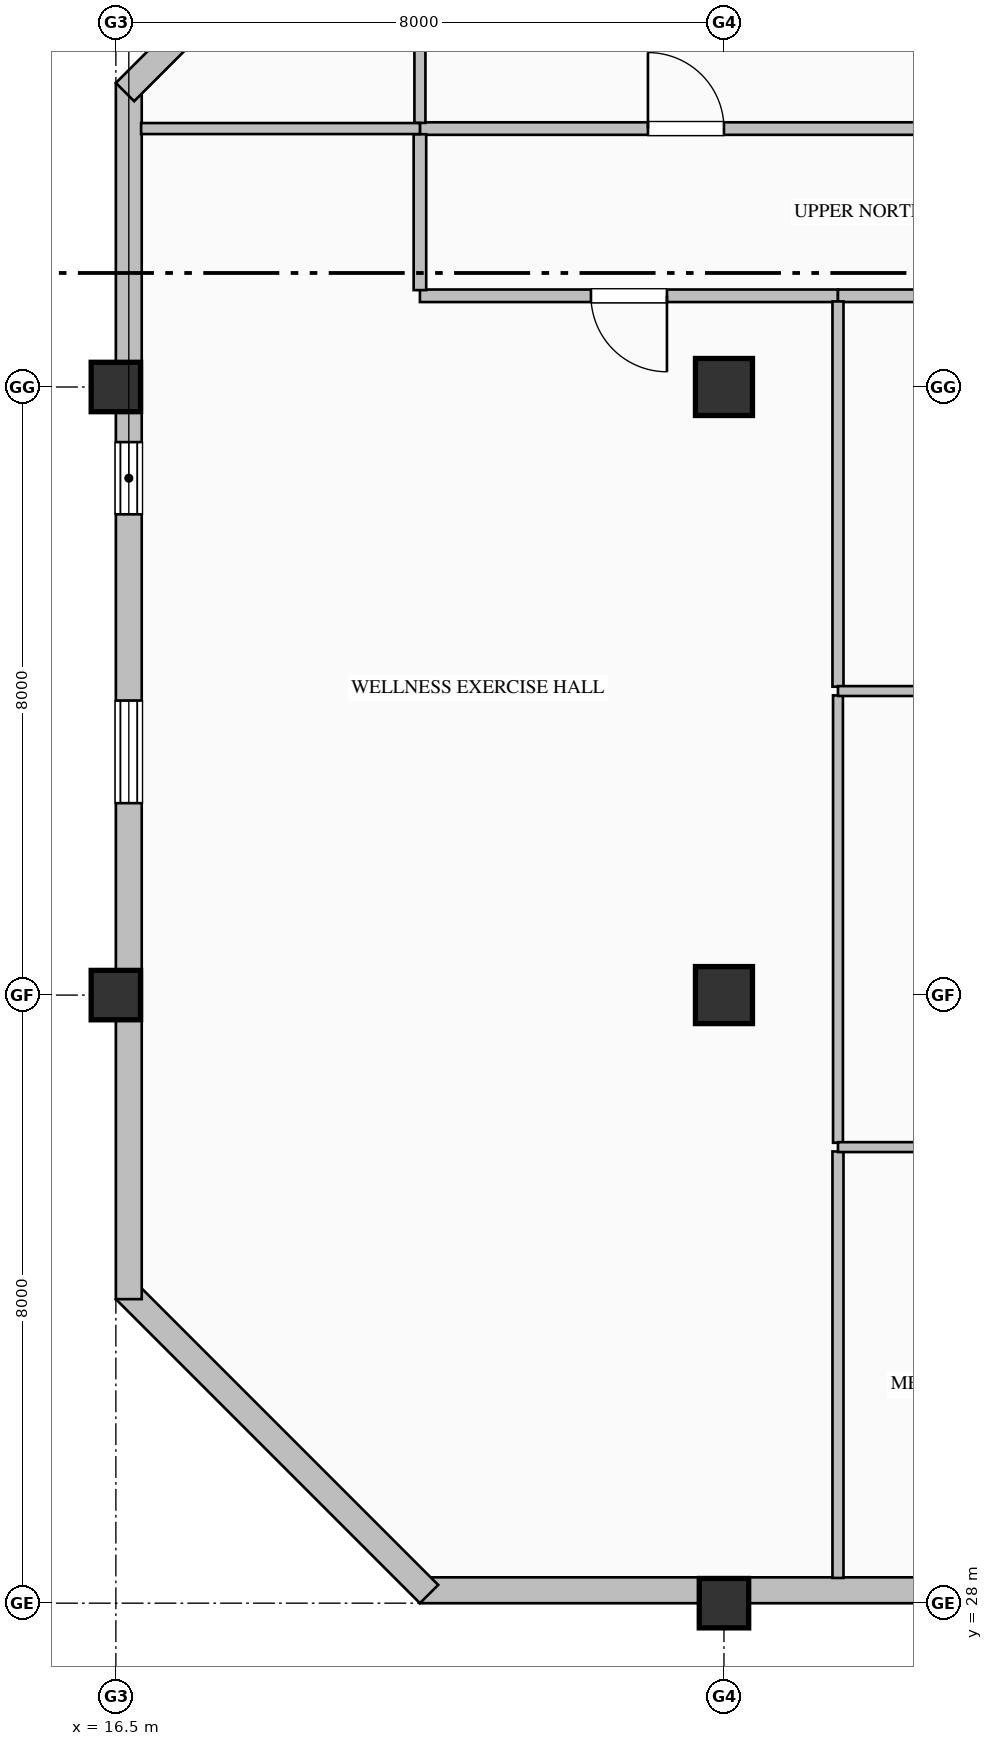
"""IFC4 building model, lengths in metres.
Left out: names, types, materials, properties, quantities, classifications, styles, units other than length and angle.
Written with IfcOpenShell. Run it as: python <this file> out.ifc"""

import sys

from ifc_helpers import new_model, si_unit, direction, frame, frame_2d, origin, origin_2d, place, context, subcontext, project, spatial, rectangle, hollow_rectangle, extrude, element, fill, save


model = new_model("IFC4")
c1 = context("Model", 3, precision=1e-05, world=origin(), true_north=direction((0.0, 1.0)))
c2 = subcontext(c1, "Body", "Model", "MODEL_VIEW")
j1 = project(units=[si_unit("LENGTHUNIT", "METRE"), si_unit("PLANEANGLEUNIT", "RADIAN")], contexts=[c1])
p1 = place(None, origin())
s1 = spatial("IfcSite", under=j1, at=p1, CompositionType="ELEMENT")
p2 = place(p1, origin())
s2 = spatial("IfcBuilding", under=s1, at=p2, CompositionType="ELEMENT")
p3 = place(p2, frame((0.0, 0.0, 339.2)))
s3 = spatial("IfcBuildingStorey", under=s2, at=p3, CompositionType="ELEMENT", Elevation=339.2)
for number, where, z_axis, x_axis in (
    (1, (16.5, 36.0, 0.0), (0.0, 0.0, 1.0), (1.0, 0.0, 0.0)),
    (2, (16.5, 44.0, 0.0), (0.0, 0.0, 1.0), (1.0, 0.0, 0.0)),
    (3, (24.5, 28.0, 0.0), (0.0, 0.0, 1.0), (1.0, 0.0, 0.0)),
):
    element("IfcColumn", number, at=place(p3, frame(where, z_axis=z_axis, x_axis=x_axis)), inside=s3, PredefinedType="COLUMN", context=c2, shape_type="SweptSolid", body=[
        extrude(hollow_rectangle(XDim=0.65, YDim=0.65, WallThickness=0.028, at=origin_2d()), origin(), (0.0, 0.0, 1.0), 4.0),
    ])
for number, where, z_axis, x_axis in (
    (4, (24.5, 36.0, 0.0), (0.0, 0.0, 1.0), (1.0, 0.0, 0.0)),
    (5, (24.5, 44.0, 0.0), (0.0, 0.0, 1.0), (1.0, 0.0, 0.0)),
):
    element("IfcColumn", number, at=place(p3, frame(where, z_axis=z_axis, x_axis=x_axis)), inside=s3, PredefinedType="COLUMN", context=c2, shape_type="SweptSolid", body=[
        extrude(rectangle(XDim=0.75, YDim=0.75, at=origin_2d()), origin(), (0.0, 0.0, 1.0), 4.0),
    ])
p4 = place(p3, frame((40.52, 28.17, 0.0), z_axis=(0.0, 0.0, 1.0), x_axis=(-1.0, 0.0, 0.0)))
e6 = element("IfcWall", 6, at=p4, inside=s3, PredefinedType="SOLIDWALL", context=c2, shape_type="SweptSolid", body=[
    extrude(rectangle(XDim=20.02, YDim=0.34, at=frame_2d((10.01, 0.0))), origin(), (0.0, 0.0, 1.0), 3.185),
])
p5 = place(p4, frame((2.925, 0.0, 0.9)))
e7 = element("IfcOpeningElement", 7, at=p5, cuts=e6, PredefinedType="OPENING", context=c2, shape_type="SweptSolid", body=[
    extrude(rectangle(XDim=1.35, YDim=1.85, at=frame_2d((0.675, 0.925))), frame((0.0, 0.18, 0.0), z_axis=(0.0, -1.0, 0.0), x_axis=(1.0, 0.0, 0.0)), (0.0, 0.0, 1.0), 0.36),
])
p6 = place(p4, frame((10.275, 0.0, 0.8)))
e8 = element("IfcOpeningElement", 8, at=p6, cuts=e6, PredefinedType="OPENING", context=c2, shape_type="SweptSolid", body=[
    extrude(rectangle(XDim=1.05, YDim=2.15, at=frame_2d((0.525, 1.075))), frame((0.0, 0.18, 0.0), z_axis=(0.0, -1.0, 0.0), x_axis=(1.0, 0.0, 0.0)), (0.0, 0.0, 1.0), 0.36),
])
p7 = place(p3, frame((20.62, 28.12, 0.0), z_axis=(0.0, 0.0, 1.0), x_axis=(-0.707106781187, 0.707106781187, 0.0)))
e9 = element("IfcWall", 9, at=p7, inside=s3, PredefinedType="SOLIDWALL", context=c2, shape_type="SweptSolid", body=[
    extrude(rectangle(XDim=5.657, YDim=0.34, at=frame_2d((2.828, 0.0))), origin(), (0.0, 0.0, 1.0), 3.785),
])
p8 = place(p3, frame((16.67, 32.0, 0.0), z_axis=(0.0, 0.0, 1.0), x_axis=(0.0, 1.0, 0.0)))
e10 = element("IfcWall", 10, at=p8, inside=s3, PredefinedType="SOLIDWALL", context=c2, shape_type="SweptSolid", body=[
    extrude(rectangle(XDim=16.0, YDim=0.34, at=frame_2d((8.0, 0.0))), origin(), (0.0, 0.0, 1.0), 3.335),
])
p9 = place(p8, frame((6.525, 0.0, 0.9)))
e11 = element("IfcOpeningElement", 11, at=p9, cuts=e10, PredefinedType="OPENING", context=c2, shape_type="SweptSolid", body=[
    extrude(rectangle(XDim=1.35, YDim=1.85, at=frame_2d((0.675, 0.925))), frame((0.0, 0.18, 0.0), z_axis=(0.0, -1.0, 0.0), x_axis=(1.0, 0.0, 0.0)), (0.0, 0.0, 1.0), 0.36),
])
p10 = place(p8, frame((10.325, 0.0, 0.9)))
e12 = element("IfcOpeningElement", 12, at=p10, cuts=e10, PredefinedType="OPENING", context=c2, shape_type="SweptSolid", body=[
    extrude(rectangle(XDim=0.95, YDim=1.85, at=frame_2d((0.475, 0.925))), frame((0.0, 0.18, 0.0), z_axis=(0.0, -1.0, 0.0), x_axis=(1.0, 0.0, 0.0)), (0.0, 0.0, 1.0), 0.36),
])
p11 = place(p3, frame((16.62, 47.88, 0.0), z_axis=(0.0, 0.0, 1.0), x_axis=(0.707106781187, 0.707106781187, 0.0)))
e13 = element("IfcWall", 13, at=p11, inside=s3, PredefinedType="SOLIDWALL", context=c2, shape_type="SweptSolid", body=[
    extrude(rectangle(XDim=5.657, YDim=0.34, at=frame_2d((2.828, 0.0))), origin(), (0.0, 0.0, 1.0), 3.785),
])
p12 = place(p3, frame((20.5, 47.4, 0.0), z_axis=(0.0, 0.0, 1.0), x_axis=(1.0, 0.0, 0.0)))
e14 = element("IfcWall", 14, at=p12, inside=s3, PredefinedType="PARTITIONING", context=c2, shape_type="SweptSolid", body=[
    extrude(rectangle(XDim=7.0, YDim=0.165, at=frame_2d((3.5, 0.0))), origin(), (0.0, 0.0, 1.0), 3.785),
])
p13 = place(p12, frame((3.0, 0.0, 0.0)))
e15 = element("IfcOpeningElement", 15, at=p13, cuts=e14, PredefinedType="OPENING", context=c2, shape_type="SweptSolid", body=[
    extrude(rectangle(XDim=1.0, YDim=2.15, at=frame_2d((0.5, 1.075))), frame((0.0, 0.093, 0.0), z_axis=(0.0, -1.0, 0.0), x_axis=(1.0, 0.0, 0.0)), (0.0, 0.0, 1.0), 0.185),
])
p14 = place(p3, frame((26.0, 45.2, 0.0), z_axis=(0.0, 0.0, 1.0), x_axis=(-1.0, 0.0, 0.0)))
e16 = element("IfcWall", 16, at=p14, inside=s3, PredefinedType="PARTITIONING", context=c2, shape_type="SweptSolid", body=[
    extrude(rectangle(XDim=5.5, YDim=0.165, at=frame_2d((2.75, 0.0))), origin(), (0.0, 0.0, 1.0), 3.785),
])
p15 = place(p14, frame((2.25, 0.0, 0.0)))
e17 = element("IfcOpeningElement", 17, at=p15, cuts=e16, PredefinedType="OPENING", context=c2, shape_type="SweptSolid", body=[
    extrude(rectangle(XDim=1.0, YDim=2.15, at=frame_2d((0.5, 1.075))), frame((0.0, 0.093, 0.0), z_axis=(0.0, -1.0, 0.0), x_axis=(1.0, 0.0, 0.0)), (0.0, 0.0, 1.0), 0.185),
])
p16 = place(p3, frame((20.5, 45.274, 0.0), z_axis=(0.0, 0.0, 1.0), x_axis=(0.0, 1.0, 0.0)))
e18 = element("IfcWall", 18, at=p16, inside=s3, PredefinedType="PARTITIONING", context=c2, shape_type="SweptSolid", body=[
    extrude(rectangle(XDim=2.051, YDim=0.165, at=frame_2d((1.025, 0.0))), origin(), (0.0, 0.0, 1.0), 3.785),
])
p17 = place(p3, frame((35.4, 45.2, 0.0), z_axis=(0.0, 0.0, 1.0), x_axis=(-1.0, 0.0, 0.0)))
e19 = element("IfcWall", 19, at=p17, inside=s3, PredefinedType="PARTITIONING", context=c2, shape_type="SweptSolid", body=[
    extrude(rectangle(XDim=9.4, YDim=0.165, at=frame_2d((4.7, 0.0))), origin(), (0.0, 0.0, 1.0), 3.785),
])
p18 = place(p17, frame((4.2, 0.0, 0.0)))
e20 = element("IfcOpeningElement", 20, at=p18, cuts=e19, PredefinedType="OPENING", context=c2, shape_type="SweptSolid", body=[
    extrude(rectangle(XDim=1.0, YDim=2.15, at=frame_2d((0.5, 1.075))), frame((0.0, 0.093, 0.0), z_axis=(0.0, -1.0, 0.0), x_axis=(1.0, 0.0, 0.0)), (0.0, 0.0, 1.0), 0.185),
])
p19 = place(p3, frame((20.5, 51.531, 0.0), z_axis=(0.0, 0.0, 1.0), x_axis=(0.0, -1.0, 0.0)))
e21 = element("IfcWall", 21, at=p19, inside=s3, PredefinedType="PARTITIONING", context=c2, shape_type="SweptSolid", body=[
    extrude(rectangle(XDim=4.056, YDim=0.145, at=frame_2d((2.028, 0.0))), origin(), (0.0, 0.0, 1.0), 3.785),
])
p20 = place(p19, frame((1.528, 0.0, 0.0)))
e22 = element("IfcOpeningElement", 22, at=p20, cuts=e21, PredefinedType="OPENING", context=c2, shape_type="SweptSolid", body=[
    extrude(rectangle(XDim=1.0, YDim=2.15, at=frame_2d((0.5, 1.075))), frame((0.0, 0.083, 0.0), z_axis=(0.0, -1.0, 0.0), x_axis=(1.0, 0.0, 0.0)), (0.0, 0.0, 1.0), 0.165),
])
p21 = place(p3, frame((20.5, 47.4, 0.0), z_axis=(0.0, 0.0, 1.0), x_axis=(-1.0, 0.0, 0.0)))
e23 = element("IfcWall", 23, at=p21, inside=s3, PredefinedType="PARTITIONING", context=c2, shape_type="SweptSolid", body=[
    extrude(rectangle(XDim=3.668, YDim=0.145, at=frame_2d((1.834, 0.0))), origin(), (0.0, 0.0, 1.0), 3.785),
])
p22 = place(p3, frame((26.0, 33.943, 0.0), z_axis=(0.0, 0.0, 1.0), x_axis=(0.0, -1.0, 0.0)))
e24 = element("IfcWall", 24, at=p22, inside=s3, PredefinedType="PARTITIONING", context=c2, shape_type="SweptSolid", body=[
    extrude(rectangle(XDim=5.611, YDim=0.145, at=frame_2d((2.806, 0.0))), origin(), (0.0, 0.0, 1.0), 3.785),
])
p23 = place(p3, frame((26.0, 39.943, 0.0), z_axis=(0.0, 0.0, 1.0), x_axis=(0.0, -1.0, 0.0)))
e25 = element("IfcWall", 25, at=p23, inside=s3, PredefinedType="PARTITIONING", context=c2, shape_type="SweptSolid", body=[
    extrude(rectangle(XDim=5.886, YDim=0.13, at=frame_2d((2.943, 0.0))), origin(), (0.0, 0.0, 1.0), 3.785),
])
p24 = place(p3, frame((26.0, 45.125, 0.0), z_axis=(0.0, 0.0, 1.0), x_axis=(0.0, -1.0, 0.0)))
e26 = element("IfcWall", 26, at=p24, inside=s3, PredefinedType="PARTITIONING", context=c2, shape_type="SweptSolid", body=[
    extrude(rectangle(XDim=5.069, YDim=0.145, at=frame_2d((2.534, 0.0))), origin(), (0.0, 0.0, 1.0), 3.785),
])
p25 = place(p3, frame((26.0, 34.0, 0.0), z_axis=(0.0, 0.0, 1.0), x_axis=(1.0, 0.0, 0.0)))
e27 = element("IfcWall", 27, at=p25, inside=s3, PredefinedType="PARTITIONING", context=c2, shape_type="SweptSolid", body=[
    extrude(rectangle(XDim=9.4, YDim=0.13, at=frame_2d((4.7, 0.0))), origin(), (0.0, 0.0, 1.0), 3.785),
])
p26 = place(p25, frame((4.2, 0.0, 0.0)))
e28 = element("IfcOpeningElement", 28, at=p26, cuts=e27, PredefinedType="OPENING", context=c2, shape_type="SweptSolid", body=[
    extrude(rectangle(XDim=1.0, YDim=2.15, at=frame_2d((0.5, 1.075))), frame((0.0, 0.075, 0.0), z_axis=(0.0, -1.0, 0.0), x_axis=(1.0, 0.0, 0.0)), (0.0, 0.0, 1.0), 0.15),
])
p27 = place(p3, frame((26.0, 40.0, 0.0), z_axis=(0.0, 0.0, 1.0), x_axis=(1.0, 0.0, 0.0)))
e29 = element("IfcWall", 29, at=p27, inside=s3, PredefinedType="PARTITIONING", context=c2, shape_type="SweptSolid", body=[
    extrude(rectangle(XDim=9.4, YDim=0.13, at=frame_2d((4.7, 0.0))), origin(), (0.0, 0.0, 1.0), 3.785),
])
p28 = place(p9, origin())
e30 = element("IfcWindow", 30, at=p28, inside=s3, PartitioningType="DOUBLE_PANEL_VERTICAL", PredefinedType="WINDOW", context=c2, shape_type="SweptSolid", body=[
    extrude(rectangle(XDim=1.35, YDim=1.85, at=frame_2d((0.675, 0.925))), frame((0.0, 0.15, 0.0), z_axis=(0.0, -1.0, 0.0), x_axis=(1.0, 0.0, 0.0)), (0.0, 0.0, 1.0), 0.06),
])
fill(e11, e30)
p29 = place(p10, origin())
e31 = element("IfcWindow", 31, at=p29, inside=s3, PartitioningType="SINGLE_PANEL", PredefinedType="WINDOW", context=c2, shape_type="SweptSolid", body=[
    extrude(rectangle(XDim=0.95, YDim=1.85, at=frame_2d((0.475, 0.925))), frame((0.0, 0.15, 0.0), z_axis=(0.0, -1.0, 0.0), x_axis=(1.0, 0.0, 0.0)), (0.0, 0.0, 1.0), 0.06),
])
fill(e12, e31)
p30 = place(p13, origin())
e32 = element("IfcDoor", 32, at=p30, inside=s3, OperationType="SINGLE_SWING_LEFT", PredefinedType="DOOR", context=c2, shape_type="SweptSolid", body=[
    extrude(rectangle(XDim=1.0, YDim=2.15, at=frame_2d((0.5, 1.075))), frame((0.0, 0.025, 0.0), z_axis=(0.0, -1.0, 0.0), x_axis=(1.0, 0.0, 0.0)), (0.0, 0.0, 1.0), 0.05),
])
fill(e15, e32)
p31 = place(p15, origin())
e33 = element("IfcDoor", 33, at=p31, inside=s3, OperationType="SINGLE_SWING_LEFT", PredefinedType="DOOR", context=c2, shape_type="SweptSolid", body=[
    extrude(rectangle(XDim=1.0, YDim=2.15, at=frame_2d((0.5, 1.075))), frame((0.0, 0.025, 0.0), z_axis=(0.0, -1.0, 0.0), x_axis=(1.0, 0.0, 0.0)), (0.0, 0.0, 1.0), 0.05),
])
fill(e17, e33)
save(model, sys.argv[1])
